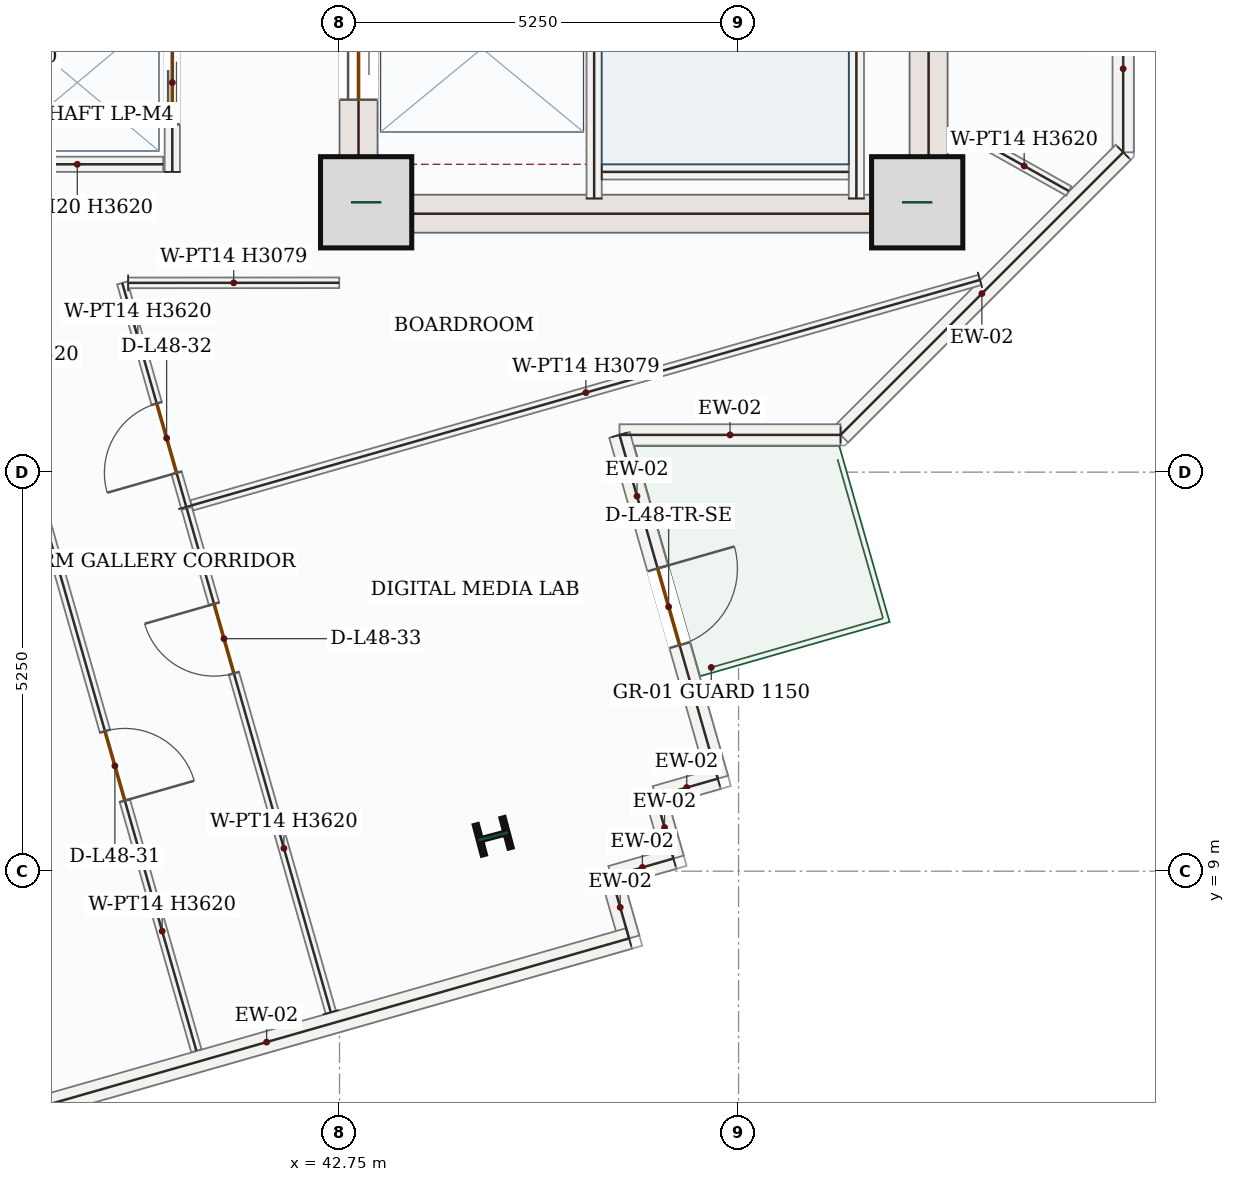
"""IFC4 building model, lengths in metres.
Left out: names, types, materials, properties, quantities, classifications, styles, units other than length and angle.
Written with IfcOpenShell. Run it as: python <this file> out.ifc"""

import sys

from ifc_helpers import new_model, si_unit, direction, frame, frame_2d, origin, origin_2d, place, context, subcontext, project, spatial, rectangle, i_section, extrude, source, transform, mapped, element, fill, save


model = new_model("IFC4")
c1 = context("Model", 3, precision=1e-05, world=origin(), true_north=direction((0.0, 1.0)))
c2 = subcontext(c1, "Body", "Model", "MODEL_VIEW")
j1 = project(units=[si_unit("LENGTHUNIT", "METRE"), si_unit("PLANEANGLEUNIT", "RADIAN")], contexts=[c1])
p1 = place(None, origin())
s1 = spatial("IfcSite", under=j1, at=p1, CompositionType="ELEMENT")
p2 = place(p1, origin())
s2 = spatial("IfcBuilding", under=s1, at=p2, CompositionType="ELEMENT")
p3 = place(p2, frame((0.0, 0.0, 205.8)))
s3 = spatial("IfcBuildingStorey", under=s2, at=p3, CompositionType="ELEMENT", Elevation=205.8)
p4 = place(p3, frame((43.0, 17.4, 0.0), z_axis=(0.0, 0.0, 1.0), x_axis=(0.0, 1.0, 0.0)))
e1 = element("IfcWall", 1, at=p4, inside=s3, PredefinedType="SHEAR", context=c2, shape_type="SweptSolid", body=[
    extrude(rectangle(XDim=8.55, YDim=0.5, at=frame_2d((4.275, 0.0))), origin(), (0.0, 0.0, 1.0), 3.62),
])
p5 = place(p4, frame((6.65, 0.0, 0.0)))
e2 = element("IfcOpeningElement", 2, at=p5, cuts=e1, PredefinedType="OPENING", context=c2, shape_type="SweptSolid", body=[
    extrude(rectangle(XDim=1.1, YDim=2.2, at=frame_2d((0.55, 1.1))), frame((0.0, 0.26, 0.0), z_axis=(0.0, -1.0, 0.0), x_axis=(1.0, 0.0, 0.0)), (0.0, 0.0, 1.0), 0.52),
])
p6 = place(p4, frame((1.75, 0.0, 0.0)))
e3 = element("IfcOpeningElement", 3, at=p6, cuts=e1, PredefinedType="OPENING", context=c2, shape_type="SweptSolid", body=[
    extrude(rectangle(XDim=1.3, YDim=2.2, at=frame_2d((0.65, 1.1))), frame((0.0, 0.26, 0.0), z_axis=(0.0, -1.0, 0.0), x_axis=(1.0, 0.0, 0.0)), (0.0, 0.0, 1.0), 0.52),
])
p7 = place(p4, frame((4.3, 0.0, 0.0)))
e4 = element("IfcOpeningElement", 4, at=p7, cuts=e1, PredefinedType="OPENING", context=c2, shape_type="SweptSolid", body=[
    extrude(rectangle(XDim=0.88, YDim=2.1, at=frame_2d((0.44, 1.05))), frame((0.0, 0.26, 0.0), z_axis=(0.0, -1.0, 0.0), x_axis=(1.0, 0.0, 0.0)), (0.0, 0.0, 1.0), 0.52),
])
m1 = source(origin(), c2, "Body", "SweptSolid", [
    extrude(rectangle(XDim=8.55, YDim=0.5, at=frame_2d((4.275, 0.0))), origin(), (0.0, 0.0, 1.0), 3.62),
])
p8 = place(p3, frame((50.5, 17.4, 0.0), z_axis=(0.0, 0.0, 1.0), x_axis=(0.0, 1.0, 0.0)))
e5 = element("IfcWall", 5, at=p8, inside=s3, PredefinedType="SHEAR", context=c2, shape_type="MappedRepresentation", body=[
    mapped(m1, transform((0.0, 0.0, 0.0), x_axis=(1.0, 0.0, 0.0), y_axis=(0.0, 1.0, 0.0), z_axis=(0.0, 0.0, 1.0), scale=1.0)),
])
m2 = source(origin(), c2, "Body", "SweptSolid", [
    extrude(rectangle(XDim=7.0, YDim=0.5, at=frame_2d((3.5, 0.0))), origin(), (0.0, 0.0, 1.0), 3.62),
])
p9 = place(p3, frame((43.25, 17.65, 0.0), z_axis=(0.0, 0.0, 1.0), x_axis=(1.0, 0.0, 0.0)))
e6 = element("IfcWall", 6, at=p9, inside=s3, PredefinedType="SHEAR", context=c2, shape_type="MappedRepresentation", body=[
    mapped(m2, transform((0.0, 0.0, 0.0), x_axis=(1.0, 0.0, 0.0), y_axis=(0.0, 1.0, 0.0), z_axis=(0.0, 0.0, 1.0), scale=1.0)),
])
m3 = source(origin(), c2, "Body", "SweptSolid", [
    extrude(rectangle(XDim=1.2, YDim=1.2, at=origin_2d()), origin(), (0.0, 0.0, 1.0), 3.9),
])
for number, where, z_axis, x_axis in (
    (7, (43.1, 17.8, 0.0), (0.0, 0.0, 1.0), (1.0, 0.0, 0.0)),
    (8, (50.35, 17.8, 0.0), (0.0, 0.0, 1.0), (1.0, 0.0, 0.0)),
):
    element("IfcColumn", number, at=place(p3, frame(where, z_axis=z_axis, x_axis=x_axis)), inside=s3, PredefinedType="COLUMN", context=c2, shape_type="MappedRepresentation", body=[
        mapped(m3, transform((0.0, 0.0, 0.0), x_axis=(1.0, 0.0, 0.0), y_axis=(0.0, 1.0, 0.0), z_axis=(0.0, 0.0, 1.0), scale=1.0)),
    ])
m4 = source(origin(), c2, "Body", "SweptSolid", [
    extrude(i_section(OverallWidth=0.404, OverallDepth=0.407, WebThickness=0.027, FlangeThickness=0.044, FilletRadius=0.018, at=origin_2d()), origin(), (0.0, 0.0, 1.0), 3.9),
])
p10 = place(p3, frame((44.772, 9.459, 0.0), z_axis=(0.0, 0.0, 1.0), x_axis=(-0.255445757936, 0.966823388604, 0.0)))
e9 = element("IfcColumn", 9, at=p10, inside=s3, PredefinedType="COLUMN", context=c2, shape_type="MappedRepresentation", body=[
    mapped(m4, transform((0.0, 0.0, 0.0), x_axis=(1.0, 0.0, 0.0), y_axis=(0.0, 1.0, 0.0), z_axis=(0.0, 0.0, 1.0), scale=1.0)),
])
p11 = place(p3, frame((53.06, 24.952, 0.0), z_axis=(0.0, 0.0, 1.0), x_axis=(0.0, -1.0, 0.0)))
e10 = element("IfcWall", 10, at=p11, inside=s3, PredefinedType="SOLIDWALL", context=c2, shape_type="SweptSolid", body=[
    extrude(rectangle(XDim=6.494, YDim=0.28, at=frame_2d((3.247, 0.0))), origin(), (0.0, 0.0, 1.0), 3.62),
])
p12 = place(p11, frame((2.347, 0.0, 0.85)))
e11 = element("IfcOpeningElement", 11, at=p12, cuts=e10, PredefinedType="OPENING", context=c2, shape_type="SweptSolid", body=[
    extrude(rectangle(XDim=1.8, YDim=1.75, at=frame_2d((0.9, 0.875))), frame((0.0, 0.15, 0.0), z_axis=(0.0, -1.0, 0.0), x_axis=(1.0, 0.0, 0.0)), (0.0, 0.0, 1.0), 0.3),
])
m5 = source(origin(), c2, "Body", "SweptSolid", [
    extrude(rectangle(XDim=5.258, YDim=0.28, at=frame_2d((2.629, 0.0))), origin(), (0.0, 0.0, 1.0), 3.62),
])
p13 = place(p3, frame((53.06, 18.458, 0.0), z_axis=(0.0, 0.0, 1.0), x_axis=(-0.707106781187, -0.707106781187, 0.0)))
e12 = element("IfcWall", 12, at=p13, inside=s3, PredefinedType="SOLIDWALL", context=c2, shape_type="MappedRepresentation", body=[
    mapped(m5, transform((0.0, 0.0, 0.0), x_axis=(1.0, 0.0, 0.0), y_axis=(0.0, 1.0, 0.0), z_axis=(0.0, 0.0, 1.0), scale=1.0)),
])
m6 = source(origin(), c2, "Body", "SweptSolid", [
    extrude(rectangle(XDim=2.909, YDim=0.28, at=frame_2d((1.455, 0.0))), origin(), (0.0, 0.0, 1.0), 3.62),
])
p14 = place(p3, frame((49.342, 14.74, 0.0), z_axis=(0.0, 0.0, 1.0), x_axis=(-1.0, 0.0, 0.0)))
e13 = element("IfcWall", 13, at=p14, inside=s3, PredefinedType="SOLIDWALL", context=c2, shape_type="MappedRepresentation", body=[
    mapped(m6, transform((0.0, 0.0, 0.0), x_axis=(1.0, 0.0, 0.0), y_axis=(0.0, 1.0, 0.0), z_axis=(0.0, 0.0, 1.0), scale=1.0)),
])
p15 = place(p3, frame((46.433, 14.74, 0.0), z_axis=(0.0, 0.0, 1.0), x_axis=(0.274981611661, -0.961449485542, 0.0)))
e14 = element("IfcWall", 14, at=p15, inside=s3, PredefinedType="SOLIDWALL", context=c2, shape_type="SweptSolid", body=[
    extrude(rectangle(XDim=4.704, YDim=0.28, at=frame_2d((2.352, 0.0))), origin(), (0.0, 0.0, 1.0), 3.62),
])
p16 = place(p15, frame((1.827, 0.0, 0.0)))
e15 = element("IfcOpeningElement", 15, at=p16, cuts=e14, PredefinedType="OPENING", context=c2, shape_type="SweptSolid", body=[
    extrude(rectangle(XDim=1.05, YDim=2.15, at=frame_2d((0.525, 1.075))), frame((0.0, 0.15, 0.0), z_axis=(0.0, -1.0, 0.0), x_axis=(1.0, 0.0, 0.0)), (0.0, 0.0, 1.0), 0.3),
])
m7 = source(origin(), c2, "Body", "SweptSolid", [
    extrude(rectangle(XDim=0.85, YDim=0.28, at=frame_2d((0.425, 0.0))), origin(), (0.0, 0.0, 1.0), 3.62),
])
p17 = place(p3, frame((47.727, 10.218, 0.0), z_axis=(0.0, 0.0, 1.0), x_axis=(-0.961469728335, -0.274910824624, 0.0)))
e16 = element("IfcWall", 16, at=p17, inside=s3, PredefinedType="SOLIDWALL", context=c2, shape_type="MappedRepresentation", body=[
    mapped(m7, transform((0.0, 0.0, 0.0), x_axis=(1.0, 0.0, 0.0), y_axis=(0.0, 1.0, 0.0), z_axis=(0.0, 0.0, 1.0), scale=1.0)),
])
m8 = source(origin(), c2, "Body", "SweptSolid", [
    extrude(rectangle(XDim=0.85, YDim=0.28, at=frame_2d((0.425, 0.0))), origin(), (0.0, 0.0, 1.0), 3.62),
])
p18 = place(p3, frame((46.909, 9.984, 0.0), z_axis=(0.0, 0.0, 1.0), x_axis=(0.274834915789, -0.961491429532, 0.0)))
e17 = element("IfcWall", 17, at=p18, inside=s3, PredefinedType="SOLIDWALL", context=c2, shape_type="MappedRepresentation", body=[
    mapped(m8, transform((0.0, 0.0, 0.0), x_axis=(1.0, 0.0, 0.0), y_axis=(0.0, 1.0, 0.0), z_axis=(0.0, 0.0, 1.0), scale=1.0)),
])
p19 = place(p3, frame((47.143, 9.167, 0.0), z_axis=(0.0, 0.0, 1.0), x_axis=(-0.961469728335, -0.274910824624, 0.0)))
e18 = element("IfcWall", 18, at=p19, inside=s3, PredefinedType="SOLIDWALL", context=c2, shape_type="MappedRepresentation", body=[
    mapped(m7, transform((0.0, 0.0, 0.0), x_axis=(1.0, 0.0, 0.0), y_axis=(0.0, 1.0, 0.0), z_axis=(0.0, 0.0, 1.0), scale=1.0)),
])
p20 = place(p3, frame((46.326, 8.933, 0.0), z_axis=(0.0, 0.0, 1.0), x_axis=(0.274834915789, -0.961491429532, 0.0)))
e19 = element("IfcWall", 19, at=p20, inside=s3, PredefinedType="SOLIDWALL", context=c2, shape_type="MappedRepresentation", body=[
    mapped(m8, transform((0.0, 0.0, 0.0), x_axis=(1.0, 0.0, 0.0), y_axis=(0.0, 1.0, 0.0), z_axis=(0.0, 0.0, 1.0), scale=1.0)),
])
m9 = source(origin(), c2, "Body", "SweptSolid", [
    extrude(rectangle(XDim=9.92, YDim=0.28, at=frame_2d((4.96, 0.0))), origin(), (0.0, 0.0, 1.0), 3.62),
])
p21 = place(p3, frame((46.56, 8.115, 0.0), z_axis=(0.0, 0.0, 1.0), x_axis=(-0.961457051276, -0.274955157346, 0.0)))
e20 = element("IfcWall", 20, at=p21, inside=s3, PredefinedType="SOLIDWALL", context=c2, shape_type="MappedRepresentation", body=[
    mapped(m9, transform((0.0, 0.0, 0.0), x_axis=(1.0, 0.0, 0.0), y_axis=(0.0, 1.0, 0.0), z_axis=(0.0, 0.0, 1.0), scale=1.0)),
])
m10 = source(origin(), c2, "Body", "SweptSolid", [
    extrude(rectangle(XDim=7.87, YDim=0.2, at=frame_2d((3.935, 0.0))), origin(), (0.0, 0.0, 1.0), 3.62),
])
p22 = place(p3, frame((49.55, 17.85, 0.0), z_axis=(0.0, 0.0, 1.0), x_axis=(0.0, 1.0, 0.0)))
e21 = element("IfcWall", 21, at=p22, inside=s3, PredefinedType="SOLIDWALL", context=c2, shape_type="MappedRepresentation", body=[
    mapped(m10, transform((0.0, 0.0, 0.0), x_axis=(1.0, 0.0, 0.0), y_axis=(0.0, 1.0, 0.0), z_axis=(0.0, 0.0, 1.0), scale=1.0)),
])
p23 = place(p3, frame((46.1, 17.85, 0.0), z_axis=(0.0, 0.0, 1.0), x_axis=(0.0, 1.0, 0.0)))
e22 = element("IfcWall", 22, at=p23, inside=s3, PredefinedType="SOLIDWALL", context=c2, shape_type="SweptSolid", body=[
    extrude(rectangle(XDim=8.0, YDim=0.2, at=frame_2d((4.0, 0.0))), origin(), (0.0, 0.0, 1.0), 3.62),
])
p24 = place(p23, frame((6.3, 0.0, 0.0)))
e23 = element("IfcOpeningElement", 23, at=p24, cuts=e22, PredefinedType="OPENING", context=c2, shape_type="SweptSolid", body=[
    extrude(rectangle(XDim=1.05, YDim=2.15, at=frame_2d((0.525, 1.075))), frame((0.0, 0.11, 0.0), z_axis=(0.0, -1.0, 0.0), x_axis=(1.0, 0.0, 0.0)), (0.0, 0.0, 1.0), 0.22),
])
m11 = source(origin(), c2, "Body", "SweptSolid", [
    extrude(rectangle(XDim=3.25, YDim=0.2, at=frame_2d((1.625, 0.0))), origin(), (0.0, 0.0, 1.0), 3.62),
])
p25 = place(p3, frame((46.2, 18.2, 0.0), z_axis=(0.0, 0.0, 1.0), x_axis=(1.0, 0.0, 0.0)))
e24 = element("IfcWall", 24, at=p25, inside=s3, PredefinedType="SOLIDWALL", context=c2, shape_type="MappedRepresentation", body=[
    mapped(m11, transform((0.0, 0.0, 0.0), x_axis=(1.0, 0.0, 0.0), y_axis=(0.0, 1.0, 0.0), z_axis=(0.0, 0.0, 1.0), scale=1.0)),
])
p26 = place(p3, frame((40.55, 18.2, 0.0), z_axis=(0.0, 0.0, 1.0), x_axis=(0.0, 1.0, 0.0)))
e25 = element("IfcWall", 25, at=p26, inside=s3, PredefinedType="SOLIDWALL", context=c2, shape_type="SweptSolid", body=[
    extrude(rectangle(XDim=2.35, YDim=0.2, at=frame_2d((1.175, 0.0))), origin(), (0.0, 0.0, 1.0), 3.62),
])
p27 = place(p26, frame((0.625, 0.0, 0.0)))
e26 = element("IfcOpeningElement", 26, at=p27, cuts=e25, PredefinedType="OPENING", context=c2, shape_type="SweptSolid", body=[
    extrude(rectangle(XDim=1.1, YDim=2.15, at=frame_2d((0.55, 1.075))), frame((0.0, 0.11, 0.0), z_axis=(0.0, -1.0, 0.0), x_axis=(1.0, 0.0, 0.0)), (0.0, 0.0, 1.0), 0.22),
])
m12 = source(origin(), c2, "Body", "SweptSolid", [
    extrude(rectangle(XDim=2.26, YDim=0.2, at=frame_2d((1.13, 0.0))), origin(), (0.0, 0.0, 1.0), 3.62),
])
p28 = place(p3, frame((38.17, 18.3, 0.0), z_axis=(0.0, 0.0, 1.0), x_axis=(1.0, 0.0, 0.0)))
e27 = element("IfcWall", 27, at=p28, inside=s3, PredefinedType="SOLIDWALL", context=c2, shape_type="MappedRepresentation", body=[
    mapped(m12, transform((0.0, 0.0, 0.0), x_axis=(1.0, 0.0, 0.0), y_axis=(0.0, 1.0, 0.0), z_axis=(0.0, 0.0, 1.0), scale=1.0)),
])
p29 = place(p3, frame((40.734, 13.792, 0.0), z_axis=(0.0, 0.0, 1.0), x_axis=(-0.274984067599, 0.961448783122, 0.0)))
e28 = element("IfcWall", 28, at=p29, inside=s3, PredefinedType="PARTITIONING", context=c2, shape_type="SweptSolid", body=[
    extrude(rectangle(XDim=3.066, YDim=0.14, at=frame_2d((1.533, 0.0))), origin(), (0.0, 0.0, 1.0), 3.62),
])
p30 = place(p29, frame((0.465, 0.0, 0.0)))
e29 = element("IfcOpeningElement", 29, at=p30, cuts=e28, PredefinedType="OPENING", context=c2, shape_type="SweptSolid", body=[
    extrude(rectangle(XDim=0.95, YDim=2.15, at=frame_2d((0.475, 1.075))), frame((0.0, 0.08, 0.0), z_axis=(0.0, -1.0, 0.0), x_axis=(1.0, 0.0, 0.0)), (0.0, 0.0, 1.0), 0.16),
])
m13 = source(origin(), c2, "Body", "SweptSolid", [
    extrude(rectangle(XDim=2.778, YDim=0.14, at=frame_2d((1.389, 0.0))), origin(), (0.0, 0.0, 1.0), 3.079),
])
p31 = place(p3, frame((39.969, 16.74, 0.0), z_axis=(0.0, 0.0, 1.0), x_axis=(0.999999903427, 0.000439483125, 0.0)))
e30 = element("IfcWall", 30, at=p31, inside=s3, PredefinedType="PARTITIONING", context=c2, shape_type="MappedRepresentation", body=[
    mapped(m13, transform((0.0, 0.0, 0.0), x_axis=(1.0, 0.0, 0.0), y_axis=(0.0, 1.0, 0.0), z_axis=(0.0, 0.0, 1.0), scale=1.0)),
])
m14 = source(origin(), c2, "Body", "SweptSolid", [
    extrude(rectangle(XDim=1.348, YDim=0.14, at=frame_2d((0.674, 0.0))), origin(), (0.0, 0.0, 1.0), 3.62),
])
p32 = place(p3, frame((51.17, 18.608, 0.0), z_axis=(0.0, 0.0, 1.0), x_axis=(0.872029904913, -0.489452597232, 0.0)))
e31 = element("IfcWall", 31, at=p32, inside=s3, PredefinedType="PARTITIONING", context=c2, shape_type="MappedRepresentation", body=[
    mapped(m14, transform((0.0, 0.0, 0.0), x_axis=(1.0, 0.0, 0.0), y_axis=(0.0, 1.0, 0.0), z_axis=(0.0, 0.0, 1.0), scale=1.0)),
])
m15 = source(origin(), c2, "Body", "SweptSolid", [
    extrude(rectangle(XDim=10.785, YDim=0.14, at=frame_2d((5.393, 0.0))), origin(), (0.0, 0.0, 1.0), 3.079),
])
p33 = place(p3, frame((51.176, 16.779, 0.0), z_axis=(0.0, 0.0, 1.0), x_axis=(-0.961454726908, -0.274963285016, 0.0)))
e32 = element("IfcWall", 32, at=p33, inside=s3, PredefinedType="PARTITIONING", context=c2, shape_type="MappedRepresentation", body=[
    mapped(m15, transform((0.0, 0.0, 0.0), x_axis=(1.0, 0.0, 0.0), y_axis=(0.0, 1.0, 0.0), z_axis=(0.0, 0.0, 1.0), scale=1.0)),
])
p34 = place(p3, frame((42.635, 7.144, 0.0), z_axis=(0.0, 0.0, 1.0), x_axis=(-0.274973646468, 0.96145176361, 0.0)))
e33 = element("IfcWall", 33, at=p34, inside=s3, PredefinedType="PARTITIONING", context=c2, shape_type="SweptSolid", body=[
    extrude(rectangle(XDim=6.895, YDim=0.14, at=frame_2d((3.448, 0.0))), origin(), (0.0, 0.0, 1.0), 3.62),
])
p35 = place(p34, frame((4.637, 0.0, 0.0)))
e34 = element("IfcOpeningElement", 34, at=p35, cuts=e33, PredefinedType="OPENING", context=c2, shape_type="SweptSolid", body=[
    extrude(rectangle(XDim=0.95, YDim=2.15, at=frame_2d((0.475, 1.075))), frame((0.0, 0.08, 0.0), z_axis=(0.0, -1.0, 0.0), x_axis=(1.0, 0.0, 0.0)), (0.0, 0.0, 1.0), 0.16),
])
p36 = place(p3, frame((38.723, 14.133, 0.0), z_axis=(0.0, 0.0, 1.0), x_axis=(0.274985856522, -0.96144827147, 0.0)))
e35 = element("IfcWall", 35, at=p36, inside=s3, PredefinedType="PARTITIONING", context=c2, shape_type="SweptSolid", body=[
    extrude(rectangle(XDim=7.795, YDim=0.14, at=frame_2d((3.897, 0.0))), origin(), (0.0, 0.0, 1.0), 3.62),
])
p37 = place(p36, frame((3.423, 0.0, 0.0)))
e36 = element("IfcOpeningElement", 36, at=p37, cuts=e35, PredefinedType="OPENING", context=c2, shape_type="SweptSolid", body=[
    extrude(rectangle(XDim=0.95, YDim=2.15, at=frame_2d((0.475, 1.075))), frame((0.0, 0.08, 0.0), z_axis=(0.0, -1.0, 0.0), x_axis=(1.0, 0.0, 0.0)), (0.0, 0.0, 1.0), 0.16),
])
m16 = source(origin(), c2, "Body", "SweptSolid", [
    extrude(rectangle(XDim=1.05, YDim=2.15, at=frame_2d((0.525, 1.075))), frame((0.0, 0.025, 0.0), z_axis=(0.0, -1.0, 0.0), x_axis=(1.0, 0.0, 0.0)), (0.0, 0.0, 1.0), 0.05),
])
p38 = place(p16, origin())
e37 = element("IfcDoor", 37, at=p38, inside=s3, OperationType="SINGLE_SWING_LEFT", PredefinedType="DOOR", context=c2, shape_type="MappedRepresentation", body=[
    mapped(m16, transform((0.0, 0.0, 0.0), x_axis=(1.0, 0.0, 0.0), y_axis=(0.0, 1.0, 0.0), z_axis=(0.0, 0.0, 1.0), scale=1.0)),
])
fill(e15, e37)
m17 = source(origin(), c2, "Body", "SweptSolid", [
    extrude(rectangle(XDim=1.3, YDim=2.2, at=frame_2d((0.65, 1.1))), frame((0.0, 0.025, 0.0), z_axis=(0.0, -1.0, 0.0), x_axis=(1.0, 0.0, 0.0)), (0.0, 0.0, 1.0), 0.05),
])
p39 = place(p6, origin())
e38 = element("IfcDoor", 38, at=p39, inside=s3, OperationType="DOUBLE_DOOR_SLIDING", PredefinedType="DOOR", context=c2, shape_type="MappedRepresentation", body=[
    mapped(m17, transform((0.0, 0.0, 0.0), x_axis=(1.0, 0.0, 0.0), y_axis=(0.0, 1.0, 0.0), z_axis=(0.0, 0.0, 1.0), scale=1.0)),
])
fill(e3, e38)
m18 = source(origin(), c2, "Body", "SweptSolid", [
    extrude(rectangle(XDim=1.1, YDim=2.15, at=frame_2d((0.55, 1.075))), frame((0.0, 0.025, 0.0), z_axis=(0.0, -1.0, 0.0), x_axis=(1.0, 0.0, 0.0)), (0.0, 0.0, 1.0), 0.05),
])
p40 = place(p27, origin())
e39 = element("IfcDoor", 39, at=p40, inside=s3, OperationType="DOUBLE_DOOR_SLIDING", PredefinedType="DOOR", context=c2, shape_type="MappedRepresentation", body=[
    mapped(m18, transform((0.0, 0.0, 0.0), x_axis=(1.0, 0.0, 0.0), y_axis=(0.0, 1.0, 0.0), z_axis=(0.0, 0.0, 1.0), scale=1.0)),
])
fill(e26, e39)
m19 = source(origin(), c2, "Body", "SweptSolid", [
    extrude(rectangle(XDim=0.95, YDim=2.15, at=frame_2d((0.475, 1.075))), frame((0.0, 0.025, 0.0), z_axis=(0.0, -1.0, 0.0), x_axis=(1.0, 0.0, 0.0)), (0.0, 0.0, 1.0), 0.05),
])
p41 = place(p37, origin())
e40 = element("IfcDoor", 40, at=p41, inside=s3, OperationType="SINGLE_SWING_RIGHT", PredefinedType="DOOR", context=c2, shape_type="MappedRepresentation", body=[
    mapped(m19, transform((0.0, 0.0, 0.0), x_axis=(1.0, 0.0, 0.0), y_axis=(0.0, 1.0, 0.0), z_axis=(0.0, 0.0, 1.0), scale=1.0)),
])
fill(e36, e40)
p42 = place(p30, origin())
e41 = element("IfcDoor", 41, at=p42, inside=s3, OperationType="SINGLE_SWING_LEFT", PredefinedType="DOOR", context=c2, shape_type="MappedRepresentation", body=[
    mapped(m19, transform((0.0, 0.0, 0.0), x_axis=(1.0, 0.0, 0.0), y_axis=(0.0, 1.0, 0.0), z_axis=(0.0, 0.0, 1.0), scale=1.0)),
])
fill(e29, e41)
p43 = place(p35, origin())
e42 = element("IfcDoor", 42, at=p43, inside=s3, OperationType="SINGLE_SWING_RIGHT", PredefinedType="DOOR", context=c2, shape_type="MappedRepresentation", body=[
    mapped(m19, transform((0.0, 0.0, 0.0), x_axis=(1.0, 0.0, 0.0), y_axis=(0.0, 1.0, 0.0), z_axis=(0.0, 0.0, 1.0), scale=1.0)),
])
fill(e34, e42)
save(model, sys.argv[1])
